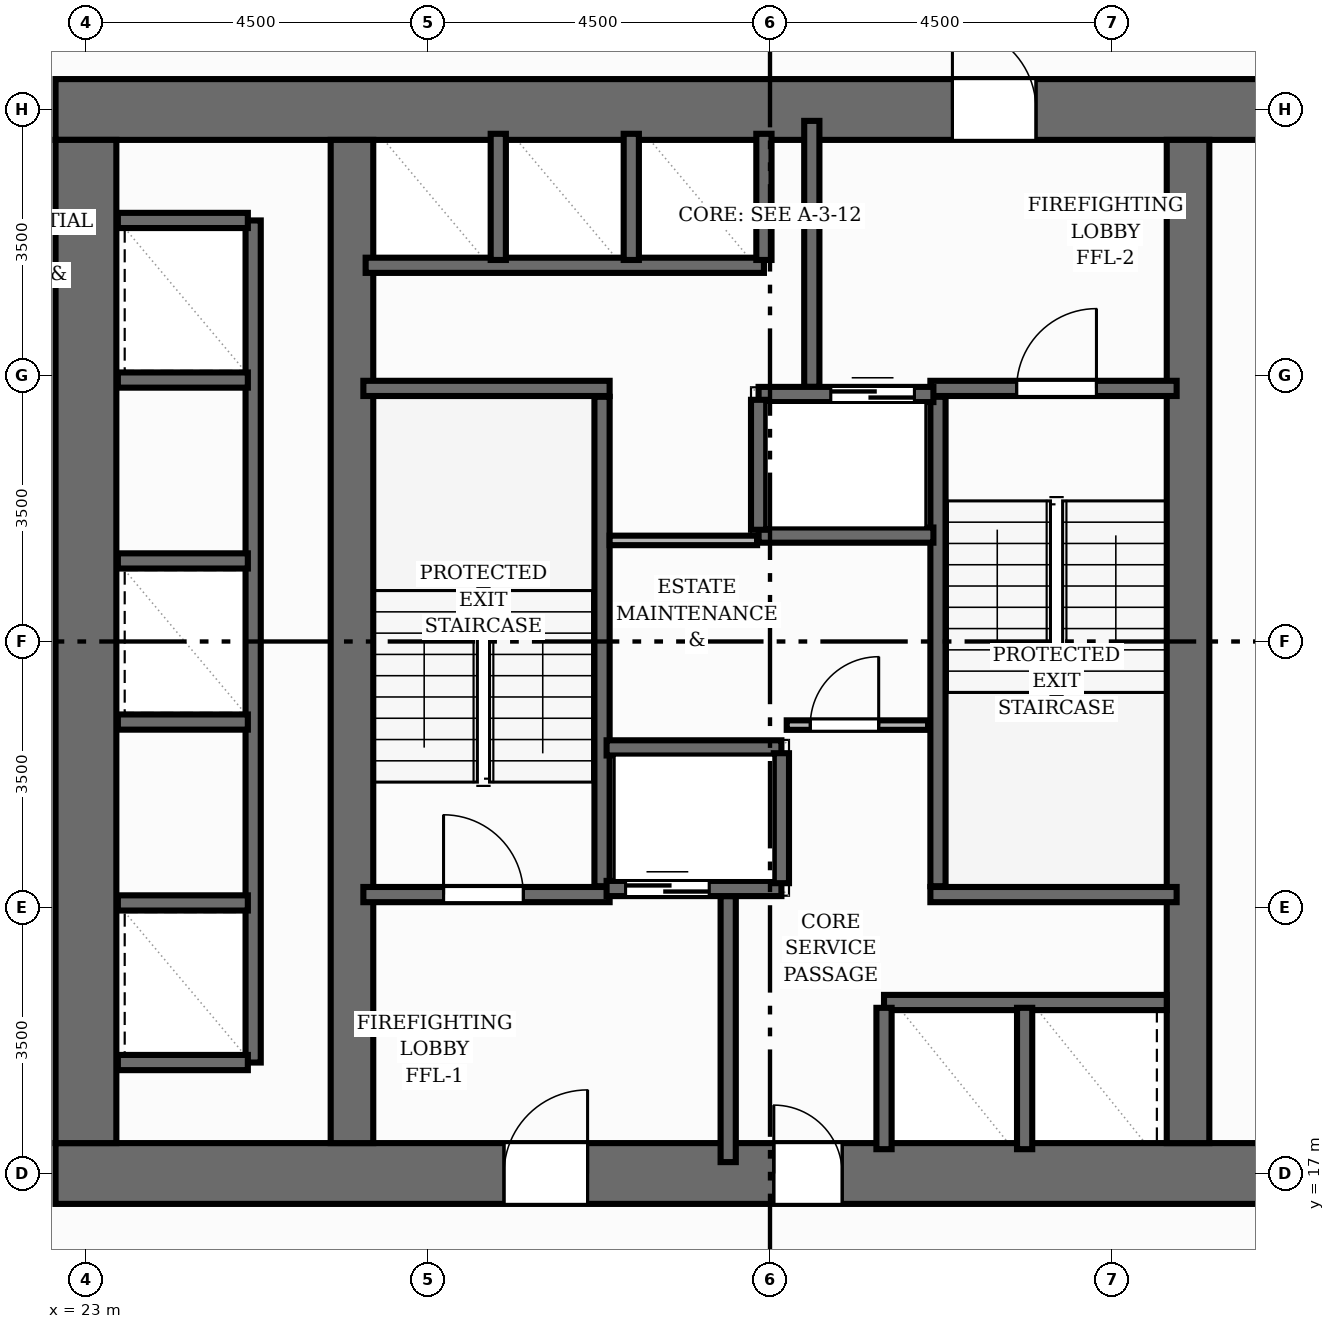
"""IFC4 building model, lengths in metres.
Left out: names, types, materials, properties, quantities, classifications, styles, units other than length and angle.
Written with IfcOpenShell. Run it as: python <this file> out.ifc"""

import sys

from ifc_helpers import new_model, si_unit, direction, frame, frame_2d, origin, place, context, subcontext, project, spatial, rectangle, extrude, element, fill, save


model = new_model("IFC4")
c1 = context("Model", 3, precision=1e-05, world=origin(), true_north=direction((0.0, 1.0)))
c2 = subcontext(c1, "Body", "Model", "MODEL_VIEW")
j1 = project(units=[si_unit("LENGTHUNIT", "METRE"), si_unit("PLANEANGLEUNIT", "RADIAN")], contexts=[c1])
p1 = place(None, origin())
s1 = spatial("IfcSite", under=j1, at=p1, CompositionType="ELEMENT")
p2 = place(p1, origin())
s2 = spatial("IfcBuilding", under=s1, at=p2, CompositionType="ELEMENT")
p3 = place(p2, frame((0.0, 0.0, 47.2)))
s3 = spatial("IfcBuildingStorey", under=s2, at=p3, CompositionType="ELEMENT", Elevation=47.2)
p4 = place(p3, frame((22.6, 17.0, 0.0), z_axis=(0.0, 0.0, 1.0), x_axis=(1.0, 0.0, 0.0)))
e1 = element("IfcWall", 1, at=p4, inside=s3, PredefinedType="SHEAR", context=c2, shape_type="SweptSolid", body=[
    extrude(rectangle(XDim=18.8, YDim=0.8, at=frame_2d((9.4, 0.0))), origin(), (0.0, 0.0, 1.0), 3.2),
])
p5 = place(p4, frame((5.9, 0.0, 0.0)))
e2 = element("IfcOpeningElement", 2, at=p5, cuts=e1, PredefinedType="OPENING", context=c2, shape_type="SweptSolid", body=[
    extrude(rectangle(XDim=1.1, YDim=2.15, at=frame_2d((0.55, 1.075))), frame((0.0, 0.41, 0.0), z_axis=(0.0, -1.0, 0.0), x_axis=(1.0, 0.0, 0.0)), (0.0, 0.0, 1.0), 0.82),
])
p6 = place(p4, frame((9.45, 0.0, 0.0)))
e3 = element("IfcOpeningElement", 3, at=p6, cuts=e1, PredefinedType="OPENING", context=c2, shape_type="SweptSolid", body=[
    extrude(rectangle(XDim=0.9, YDim=2.1, at=frame_2d((0.45, 1.05))), frame((0.0, 0.41, 0.0), z_axis=(0.0, -1.0, 0.0), x_axis=(1.0, 0.0, 0.0)), (0.0, 0.0, 1.0), 0.82),
])
p7 = place(p3, frame((22.6, 31.0, 0.0), z_axis=(0.0, 0.0, 1.0), x_axis=(1.0, 0.0, 0.0)))
e4 = element("IfcWall", 4, at=p7, inside=s3, PredefinedType="SHEAR", context=c2, shape_type="SweptSolid", body=[
    extrude(rectangle(XDim=18.8, YDim=0.8, at=frame_2d((9.4, 0.0))), origin(), (0.0, 0.0, 1.0), 3.2),
])
p8 = place(p7, frame((11.8, 0.0, 0.0)))
e5 = element("IfcOpeningElement", 5, at=p8, cuts=e4, PredefinedType="OPENING", context=c2, shape_type="SweptSolid", body=[
    extrude(rectangle(XDim=1.1, YDim=2.15, at=frame_2d((0.55, 1.075))), frame((0.0, 0.41, 0.0), z_axis=(0.0, -1.0, 0.0), x_axis=(1.0, 0.0, 0.0)), (0.0, 0.0, 1.0), 0.82),
])
p9 = place(p3, frame((23.0, 17.4, 0.0), z_axis=(0.0, 0.0, 1.0), x_axis=(0.0, 1.0, 0.0)))
e6 = element("IfcWall", 6, at=p9, inside=s3, PredefinedType="SHEAR", context=c2, shape_type="SweptSolid", body=[
    extrude(rectangle(XDim=13.2, YDim=0.8, at=frame_2d((6.6, 0.0))), origin(), (0.0, 0.0, 1.0), 3.2),
])
for number, where, z_axis, x_axis in (
    (7, (26.5, 17.4, 0.0), (0.0, 0.0, 1.0), (0.0, 1.0, 0.0)),
    (8, (37.5, 17.4, 0.0), (0.0, 0.0, 1.0), (0.0, 1.0, 0.0)),
):
    element("IfcWall", number, at=place(p3, frame(where, z_axis=z_axis, x_axis=x_axis)), inside=s3, PredefinedType="SHEAR", context=c2, shape_type="SweptSolid", body=[
        extrude(rectangle(XDim=13.2, YDim=0.56, at=frame_2d((6.6, 0.0))), origin(), (0.0, 0.0, 1.0), 3.2),
    ])
p10 = place(p3, frame((29.79, 20.78, 0.0), z_axis=(0.0, 0.0, 1.0), x_axis=(0.0, 1.0, 0.0)))
e9 = element("IfcWall", 9, at=p10, inside=s3, PredefinedType="SHEAR", context=c2, shape_type="SweptSolid", body=[
    extrude(rectangle(XDim=6.44, YDim=0.2, at=frame_2d((3.22, 0.0))), origin(), (0.0, 0.0, 1.0), 3.2),
])
p11 = place(p3, frame((26.65, 27.33, 0.0), z_axis=(0.0, 0.0, 1.0), x_axis=(1.0, 0.0, 0.0)))
e10 = element("IfcWall", 10, at=p11, inside=s3, PredefinedType="SHEAR", context=c2, shape_type="SweptSolid", body=[
    extrude(rectangle(XDim=3.24, YDim=0.2, at=frame_2d((1.62, 0.0))), origin(), (0.0, 0.0, 1.0), 3.2),
])
p12 = place(p3, frame((26.65, 20.67, 0.0), z_axis=(0.0, 0.0, 1.0), x_axis=(1.0, 0.0, 0.0)))
e11 = element("IfcWall", 11, at=p12, inside=s3, PredefinedType="SHEAR", context=c2, shape_type="SweptSolid", body=[
    extrude(rectangle(XDim=3.24, YDim=0.2, at=frame_2d((1.62, 0.0))), origin(), (0.0, 0.0, 1.0), 3.2),
])
p13 = place(p12, frame((1.055, 0.0, 0.0)))
e12 = element("IfcOpeningElement", 12, at=p13, cuts=e11, PredefinedType="OPENING", context=c2, shape_type="SweptSolid", body=[
    extrude(rectangle(XDim=1.05, YDim=2.15, at=frame_2d((0.525, 1.075))), frame((0.0, 0.11, 0.0), z_axis=(0.0, -1.0, 0.0), x_axis=(1.0, 0.0, 0.0)), (0.0, 0.0, 1.0), 0.22),
])
p14 = place(p3, frame((34.21, 20.78, 0.0), z_axis=(0.0, 0.0, 1.0), x_axis=(0.0, 1.0, 0.0)))
e13 = element("IfcWall", 13, at=p14, inside=s3, PredefinedType="SHEAR", context=c2, shape_type="SweptSolid", body=[
    extrude(rectangle(XDim=6.44, YDim=0.2, at=frame_2d((3.22, 0.0))), origin(), (0.0, 0.0, 1.0), 3.2),
])
p15 = place(p3, frame((34.11, 20.67, 0.0), z_axis=(0.0, 0.0, 1.0), x_axis=(1.0, 0.0, 0.0)))
e14 = element("IfcWall", 14, at=p15, inside=s3, PredefinedType="SHEAR", context=c2, shape_type="SweptSolid", body=[
    extrude(rectangle(XDim=3.24, YDim=0.2, at=frame_2d((1.62, 0.0))), origin(), (0.0, 0.0, 1.0), 3.2),
])
p16 = place(p3, frame((34.11, 27.33, 0.0), z_axis=(0.0, 0.0, 1.0), x_axis=(1.0, 0.0, 0.0)))
e15 = element("IfcWall", 15, at=p16, inside=s3, PredefinedType="SHEAR", context=c2, shape_type="SweptSolid", body=[
    extrude(rectangle(XDim=3.24, YDim=0.2, at=frame_2d((1.62, 0.0))), origin(), (0.0, 0.0, 1.0), 3.2),
])
p17 = place(p16, frame((1.135, 0.0, 0.0)))
e16 = element("IfcOpeningElement", 16, at=p17, cuts=e15, PredefinedType="OPENING", context=c2, shape_type="SweptSolid", body=[
    extrude(rectangle(XDim=1.05, YDim=2.15, at=frame_2d((0.525, 1.075))), frame((0.0, 0.11, 0.0), z_axis=(0.0, -1.0, 0.0), x_axis=(1.0, 0.0, 0.0)), (0.0, 0.0, 1.0), 0.22),
])
for number, where, z_axis, x_axis in (
    (17, (31.45, 17.15, 0.0), (0.0, 0.0, 1.0), (0.0, 1.0, 0.0)),
    (18, (32.55, 27.35, 0.0), (0.0, 0.0, 1.0), (0.0, 1.0, 0.0)),
):
    element("IfcWall", number, at=place(p3, frame(where, z_axis=z_axis, x_axis=x_axis)), inside=s3, PredefinedType="SHEAR", context=c2, shape_type="SweptSolid", body=[
        extrude(rectangle(XDim=3.5, YDim=0.2, at=frame_2d((1.75, 0.0))), origin(), (0.0, 0.0, 1.0), 3.2),
    ])
p18 = place(p3, frame((29.85, 20.75, 0.0), z_axis=(0.0, 0.0, 1.0), x_axis=(1.0, 0.0, 0.0)))
e19 = element("IfcWall", 19, at=p18, inside=s3, PredefinedType="SHEAR", context=c2, shape_type="SweptSolid", body=[
    extrude(rectangle(XDim=2.3, YDim=0.2, at=frame_2d((1.15, 0.0))), origin(), (0.0, 0.0, 1.0), 3.2),
])
p19 = place(p18, frame((0.25, 0.0, 0.0)))
e20 = element("IfcOpeningElement", 20, at=p19, cuts=e19, PredefinedType="OPENING", context=c2, shape_type="SweptSolid", body=[
    extrude(rectangle(XDim=1.1, YDim=2.15, at=frame_2d((0.55, 1.075))), frame((0.0, 0.11, 0.0), z_axis=(0.0, -1.0, 0.0), x_axis=(1.0, 0.0, 0.0)), (0.0, 0.0, 1.0), 0.22),
])
p20 = place(p3, frame((29.85, 22.6, 0.0), z_axis=(0.0, 0.0, 1.0), x_axis=(1.0, 0.0, 0.0)))
e21 = element("IfcWall", 21, at=p20, inside=s3, PredefinedType="SHEAR", context=c2, shape_type="SweptSolid", body=[
    extrude(rectangle(XDim=2.3, YDim=0.2, at=frame_2d((1.15, 0.0))), origin(), (0.0, 0.0, 1.0), 3.2),
])
p21 = place(p3, frame((32.15, 20.82, 0.0), z_axis=(0.0, 0.0, 1.0), x_axis=(0.0, 1.0, 0.0)))
e22 = element("IfcWall", 22, at=p21, inside=s3, PredefinedType="SHEAR", context=c2, shape_type="SweptSolid", body=[
    extrude(rectangle(XDim=1.71, YDim=0.2, at=frame_2d((0.855, 0.0))), origin(), (0.0, 0.0, 1.0), 3.2),
])
p22 = place(p3, frame((31.85, 27.25, 0.0), z_axis=(0.0, 0.0, 1.0), x_axis=(1.0, 0.0, 0.0)))
e23 = element("IfcWall", 23, at=p22, inside=s3, PredefinedType="SHEAR", context=c2, shape_type="SweptSolid", body=[
    extrude(rectangle(XDim=2.3, YDim=0.2, at=frame_2d((1.15, 0.0))), origin(), (0.0, 0.0, 1.0), 3.2),
])
p23 = place(p22, frame((0.95, 0.0, 0.0)))
e24 = element("IfcOpeningElement", 24, at=p23, cuts=e23, PredefinedType="OPENING", context=c2, shape_type="SweptSolid", body=[
    extrude(rectangle(XDim=1.1, YDim=2.15, at=frame_2d((0.55, 1.075))), frame((0.0, 0.11, 0.0), z_axis=(0.0, -1.0, 0.0), x_axis=(1.0, 0.0, 0.0)), (0.0, 0.0, 1.0), 0.22),
])
p24 = place(p3, frame((31.85, 25.4, 0.0), z_axis=(0.0, 0.0, 1.0), x_axis=(1.0, 0.0, 0.0)))
e25 = element("IfcWall", 25, at=p24, inside=s3, PredefinedType="SHEAR", context=c2, shape_type="SweptSolid", body=[
    extrude(rectangle(XDim=2.3, YDim=0.2, at=frame_2d((1.15, 0.0))), origin(), (0.0, 0.0, 1.0), 3.2),
])
p25 = place(p3, frame((31.85, 25.47, 0.0), z_axis=(0.0, 0.0, 1.0), x_axis=(0.0, 1.0, 0.0)))
e26 = element("IfcWall", 26, at=p25, inside=s3, PredefinedType="SHEAR", context=c2, shape_type="SweptSolid", body=[
    extrude(rectangle(XDim=1.71, YDim=0.2, at=frame_2d((0.855, 0.0))), origin(), (0.0, 0.0, 1.0), 3.2),
])
p26 = place(p3, frame((25.2, 18.46, 0.0), z_axis=(0.0, 0.0, 1.0), x_axis=(0.0, 1.0, 0.0)))
e27 = element("IfcWall", 27, at=p26, inside=s3, PredefinedType="SHEAR", context=c2, shape_type="SweptSolid", body=[
    extrude(rectangle(XDim=11.08, YDim=0.2, at=frame_2d((5.54, 0.0))), origin(), (0.0, 0.0, 1.0), 3.2),
])
for number, where, z_axis, x_axis in (
    (28, (23.42, 18.46, 0.0), (0.0, 0.0, 1.0), (1.0, 0.0, 0.0)),
    (29, (23.42, 29.54, 0.0), (0.0, 0.0, 1.0), (1.0, 0.0, 0.0)),
    (30, (23.42, 20.56, 0.0), (0.0, 0.0, 1.0), (1.0, 0.0, 0.0)),
    (31, (23.42, 22.94, 0.0), (0.0, 0.0, 1.0), (1.0, 0.0, 0.0)),
    (32, (23.42, 25.06, 0.0), (0.0, 0.0, 1.0), (1.0, 0.0, 0.0)),
    (33, (23.42, 27.44, 0.0), (0.0, 0.0, 1.0), (1.0, 0.0, 0.0)),
):
    element("IfcWall", number, at=place(p3, frame(where, z_axis=z_axis, x_axis=x_axis)), inside=s3, PredefinedType="SHEAR", context=c2, shape_type="SweptSolid", body=[
        extrude(rectangle(XDim=1.71, YDim=0.2, at=frame_2d((0.855, 0.0))), origin(), (0.0, 0.0, 1.0), 3.2),
    ])
p27 = place(p3, frame((26.68, 28.95, 0.0), z_axis=(0.0, 0.0, 1.0), x_axis=(1.0, 0.0, 0.0)))
e34 = element("IfcWall", 34, at=p27, inside=s3, PredefinedType="SHEAR", context=c2, shape_type="SweptSolid", body=[
    extrude(rectangle(XDim=5.24, YDim=0.2, at=frame_2d((2.62, 0.0))), origin(), (0.0, 0.0, 1.0), 3.2),
])
for number, where, z_axis, x_axis in (
    (35, (31.92, 29.02, 0.0), (0.0, 0.0, 1.0), (0.0, 1.0, 0.0)),
    (36, (28.425, 29.02, 0.0), (0.0, 0.0, 1.0), (0.0, 1.0, 0.0)),
    (37, (30.175, 29.02, 0.0), (0.0, 0.0, 1.0), (0.0, 1.0, 0.0)),
):
    element("IfcWall", number, at=place(p3, frame(where, z_axis=z_axis, x_axis=x_axis)), inside=s3, PredefinedType="SHEAR", context=c2, shape_type="SweptSolid", body=[
        extrude(rectangle(XDim=1.66, YDim=0.2, at=frame_2d((0.83, 0.0))), origin(), (0.0, 0.0, 1.0), 3.2),
    ])
p28 = place(p3, frame((33.5, 19.25, 0.0), z_axis=(0.0, 0.0, 1.0), x_axis=(1.0, 0.0, 0.0)))
e38 = element("IfcWall", 38, at=p28, inside=s3, PredefinedType="SHEAR", context=c2, shape_type="SweptSolid", body=[
    extrude(rectangle(XDim=3.72, YDim=0.2, at=frame_2d((1.86, 0.0))), origin(), (0.0, 0.0, 1.0), 3.2),
])
for number, where, z_axis, x_axis in (
    (39, (33.5, 17.32, 0.0), (0.0, 0.0, 1.0), (0.0, 1.0, 0.0)),
    (40, (35.35, 17.32, 0.0), (0.0, 0.0, 1.0), (0.0, 1.0, 0.0)),
):
    element("IfcWall", number, at=place(p3, frame(where, z_axis=z_axis, x_axis=x_axis)), inside=s3, PredefinedType="SHEAR", context=c2, shape_type="SweptSolid", body=[
        extrude(rectangle(XDim=1.86, YDim=0.2, at=frame_2d((0.93, 0.0))), origin(), (0.0, 0.0, 1.0), 3.2),
    ])
p29 = place(p3, frame((32.22, 22.9, 0.0), z_axis=(0.0, 0.0, 1.0), x_axis=(1.0, 0.0, 0.0)))
e41 = element("IfcWall", 41, at=p29, inside=s3, PredefinedType="PARTITIONING", context=c2, shape_type="SweptSolid", body=[
    extrude(rectangle(XDim=1.86, YDim=0.125, at=frame_2d((0.93, 0.0))), origin(), (0.0, 0.0, 1.0), 2.955),
])
p30 = place(p29, frame((0.31, 0.0, 0.0)))
e42 = element("IfcOpeningElement", 42, at=p30, cuts=e41, PredefinedType="OPENING", context=c2, shape_type="SweptSolid", body=[
    extrude(rectangle(XDim=0.9, YDim=2.1, at=frame_2d((0.45, 1.05))), frame((0.0, 0.073, 0.0), z_axis=(0.0, -1.0, 0.0), x_axis=(1.0, 0.0, 0.0)), (0.0, 0.0, 1.0), 0.145),
])
p31 = place(p3, frame((29.89, 25.33, 0.0), z_axis=(0.0, 0.0, 1.0), x_axis=(1.0, 0.0, 0.0)))
e43 = element("IfcWall", 43, at=p31, inside=s3, PredefinedType="PARTITIONING", context=c2, shape_type="SweptSolid", body=[
    extrude(rectangle(XDim=1.94, YDim=0.125, at=frame_2d((0.97, 0.0))), origin(), (0.0, 0.0, 1.0), 2.955),
])
p32 = place(p13, origin())
e44 = element("IfcDoor", 44, at=p32, inside=s3, OperationType="SINGLE_SWING_LEFT", PredefinedType="DOOR", context=c2, shape_type="SweptSolid", body=[
    extrude(rectangle(XDim=1.05, YDim=2.15, at=frame_2d((0.525, 1.075))), frame((0.0, 0.025, 0.0), z_axis=(0.0, -1.0, 0.0), x_axis=(1.0, 0.0, 0.0)), (0.0, 0.0, 1.0), 0.05),
])
fill(e12, e44)
p33 = place(p17, origin())
e45 = element("IfcDoor", 45, at=p33, inside=s3, OperationType="SINGLE_SWING_RIGHT", PredefinedType="DOOR", context=c2, shape_type="SweptSolid", body=[
    extrude(rectangle(XDim=1.05, YDim=2.15, at=frame_2d((0.525, 1.075))), frame((0.0, 0.025, 0.0), z_axis=(0.0, -1.0, 0.0), x_axis=(1.0, 0.0, 0.0)), (0.0, 0.0, 1.0), 0.05),
])
fill(e16, e45)
p34 = place(p5, origin())
e46 = element("IfcDoor", 46, at=p34, inside=s3, OperationType="SINGLE_SWING_RIGHT", PredefinedType="DOOR", context=c2, shape_type="SweptSolid", body=[
    extrude(rectangle(XDim=1.1, YDim=2.15, at=frame_2d((0.55, 1.075))), frame((0.0, 0.025, 0.0), z_axis=(0.0, -1.0, 0.0), x_axis=(1.0, 0.0, 0.0)), (0.0, 0.0, 1.0), 0.05),
])
fill(e2, e46)
p35 = place(p8, origin())
e47 = element("IfcDoor", 47, at=p35, inside=s3, OperationType="SINGLE_SWING_LEFT", PredefinedType="DOOR", context=c2, shape_type="SweptSolid", body=[
    extrude(rectangle(XDim=1.1, YDim=2.15, at=frame_2d((0.55, 1.075))), frame((0.0, 0.025, 0.0), z_axis=(0.0, -1.0, 0.0), x_axis=(1.0, 0.0, 0.0)), (0.0, 0.0, 1.0), 0.05),
])
fill(e5, e47)
p36 = place(p19, origin())
e48 = element("IfcDoor", 48, at=p36, inside=s3, OperationType="DOUBLE_DOOR_SLIDING", PredefinedType="DOOR", context=c2, shape_type="SweptSolid", body=[
    extrude(rectangle(XDim=1.1, YDim=2.15, at=frame_2d((0.55, 1.075))), frame((0.0, 0.025, 0.0), z_axis=(0.0, -1.0, 0.0), x_axis=(1.0, 0.0, 0.0)), (0.0, 0.0, 1.0), 0.05),
])
fill(e20, e48)
p37 = place(p23, origin())
e49 = element("IfcDoor", 49, at=p37, inside=s3, OperationType="DOUBLE_DOOR_SLIDING", PredefinedType="DOOR", context=c2, shape_type="SweptSolid", body=[
    extrude(rectangle(XDim=1.1, YDim=2.15, at=frame_2d((0.55, 1.075))), frame((0.0, 0.025, 0.0), z_axis=(0.0, -1.0, 0.0), x_axis=(1.0, 0.0, 0.0)), (0.0, 0.0, 1.0), 0.05),
])
fill(e24, e49)
p38 = place(p6, origin())
e50 = element("IfcDoor", 50, at=p38, inside=s3, OperationType="SINGLE_SWING_LEFT", PredefinedType="DOOR", context=c2, shape_type="SweptSolid", body=[
    extrude(rectangle(XDim=0.9, YDim=2.1, at=frame_2d((0.45, 1.05))), frame((0.0, 0.025, 0.0), z_axis=(0.0, -1.0, 0.0), x_axis=(1.0, 0.0, 0.0)), (0.0, 0.0, 1.0), 0.05),
])
fill(e3, e50)
p39 = place(p30, origin())
e51 = element("IfcDoor", 51, at=p39, inside=s3, OperationType="SINGLE_SWING_RIGHT", PredefinedType="DOOR", context=c2, shape_type="SweptSolid", body=[
    extrude(rectangle(XDim=0.9, YDim=2.1, at=frame_2d((0.45, 1.05))), frame((0.0, 0.025, 0.0), z_axis=(0.0, -1.0, 0.0), x_axis=(1.0, 0.0, 0.0)), (0.0, 0.0, 1.0), 0.05),
])
fill(e42, e51)
save(model, sys.argv[1])
